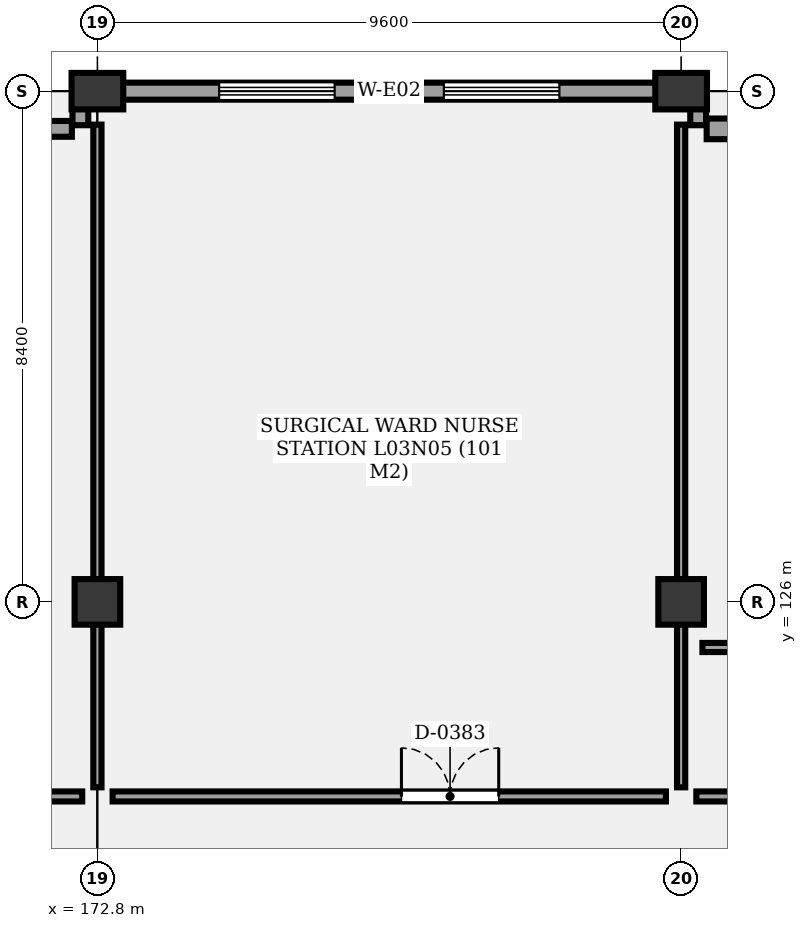
"""IFC4 building model, lengths in metres.
Left out: names, types, materials, properties, quantities, classifications, styles, units other than length and angle.
Written with IfcOpenShell. Run it as: python <this file> out.ifc"""

import sys

from ifc_helpers import new_model, si_unit, direction, frame, frame_2d, origin, origin_2d, place, context, subcontext, project, spatial, rectangle, extrude, element, fill, save


model = new_model("IFC4")
c1 = context("Model", 3, precision=1e-05, world=origin(), true_north=direction((0.0, 1.0)))
c2 = subcontext(c1, "Body", "Model", "MODEL_VIEW")
j1 = project(units=[si_unit("LENGTHUNIT", "METRE"), si_unit("PLANEANGLEUNIT", "RADIAN")], contexts=[c1])
p1 = place(None, origin())
s1 = spatial("IfcSite", under=j1, at=p1, CompositionType="ELEMENT")
p2 = place(p1, origin())
s2 = spatial("IfcBuilding", under=s1, at=p2, CompositionType="ELEMENT")
p3 = place(p2, frame((0.0, 0.0, 13.5)))
s3 = spatial("IfcBuildingStorey", under=s2, at=p3, CompositionType="ELEMENT", Elevation=13.5)
p4 = place(p3, frame((172.8, 126.0, 0.0), z_axis=(0.0, 0.0, 1.0), x_axis=(1.0, 0.0, 0.0)))
e1 = element("IfcColumn", 1, at=p4, inside=s3, PredefinedType="COLUMN", context=c2, shape_type="SweptSolid", body=[
    extrude(rectangle(XDim=0.75, YDim=0.75, at=origin_2d()), origin(), (0.0, 0.0, 1.0), 4.3),
])
p5 = place(p3, frame((172.8, 134.4, 0.0), z_axis=(0.0, 0.0, 1.0), x_axis=(1.0, 0.0, 0.0)))
e2 = element("IfcColumn", 2, at=p5, inside=s3, PredefinedType="COLUMN", context=c2, shape_type="SweptSolid", body=[
    extrude(rectangle(XDim=0.85, YDim=0.6, at=origin_2d()), origin(), (0.0, 0.0, 1.0), 4.3),
])
p6 = place(p3, frame((182.4, 126.0, 0.0), z_axis=(0.0, 0.0, 1.0), x_axis=(1.0, 0.0, 0.0)))
e3 = element("IfcColumn", 3, at=p6, inside=s3, PredefinedType="COLUMN", context=c2, shape_type="SweptSolid", body=[
    extrude(rectangle(XDim=0.75, YDim=0.75, at=origin_2d()), origin(), (0.0, 0.0, 1.0), 4.3),
])
p7 = place(p3, frame((182.4, 134.4, 0.0), z_axis=(0.0, 0.0, 1.0), x_axis=(1.0, 0.0, 0.0)))
e4 = element("IfcColumn", 4, at=p7, inside=s3, PredefinedType="COLUMN", context=c2, shape_type="SweptSolid", body=[
    extrude(rectangle(XDim=0.85, YDim=0.6, at=origin_2d()), origin(), (0.0, 0.0, 1.0), 4.3),
])
p8 = place(p3, frame((172.52, 134.2, 0.0), z_axis=(0.0, 0.0, 1.0), x_axis=(0.0, -1.0, 0.0)))
e5 = element("IfcWall", 5, at=p8, inside=s3, PredefinedType="SOLIDWALL", context=c2, shape_type="SweptSolid", body=[
    extrude(rectangle(XDim=0.36, YDim=0.26, at=frame_2d((0.18, 0.0))), origin(), (0.0, 0.0, 1.0), 3.49),
])
p9 = place(p3, frame((154.02, 133.78, 0.0), z_axis=(0.0, 0.0, 1.0), x_axis=(1.0, 0.0, 0.0)))
e6 = element("IfcWall", 6, at=p9, inside=s3, PredefinedType="SOLIDWALL", context=c2, shape_type="SweptSolid", body=[
    extrude(rectangle(XDim=18.36, YDim=0.26, at=frame_2d((9.18, 0.0))), origin(), (0.0, 0.0, 1.0), 3.49),
])
p10 = place(p3, frame((172.8, 134.4, 0.0), z_axis=(0.0, 0.0, 1.0), x_axis=(1.0, 0.0, 0.0)))
e7 = element("IfcWall", 7, at=p10, inside=s3, PredefinedType="SOLIDWALL", context=c2, shape_type="SweptSolid", body=[
    extrude(rectangle(XDim=9.6, YDim=0.28, at=frame_2d((4.8, 0.0))), origin(), (0.0, 0.0, 1.0), 3.49),
])
p11 = place(p10, frame((2.002, 0.0, 0.85)))
e8 = element("IfcOpeningElement", 8, at=p11, cuts=e7, PredefinedType="OPENING", context=c2, shape_type="SweptSolid", body=[
    extrude(rectangle(XDim=1.9, YDim=1.2, at=frame_2d((0.95, 0.6))), frame((0.0, 0.15, 0.0), z_axis=(0.0, -1.0, 0.0), x_axis=(1.0, 0.0, 0.0)), (0.0, 0.0, 1.0), 0.3),
])
p12 = place(p10, frame((5.698, 0.0, 0.85)))
e9 = element("IfcOpeningElement", 9, at=p12, cuts=e7, PredefinedType="OPENING", context=c2, shape_type="SweptSolid", body=[
    extrude(rectangle(XDim=1.9, YDim=1.2, at=frame_2d((0.95, 0.6))), frame((0.0, 0.15, 0.0), z_axis=(0.0, -1.0, 0.0), x_axis=(1.0, 0.0, 0.0)), (0.0, 0.0, 1.0), 0.3),
])
p13 = place(p3, frame((182.68, 134.2, 0.0), z_axis=(0.0, 0.0, 1.0), x_axis=(0.0, -1.0, 0.0)))
e10 = element("IfcWall", 10, at=p13, inside=s3, PredefinedType="SOLIDWALL", context=c2, shape_type="SweptSolid", body=[
    extrude(rectangle(XDim=0.36, YDim=0.26, at=frame_2d((0.18, 0.0))), origin(), (0.0, 0.0, 1.0), 3.49),
])
p14 = place(p3, frame((182.82, 133.78, 0.0), z_axis=(0.0, 0.0, 1.0), x_axis=(1.0, 0.0, 0.0)))
e11 = element("IfcWall", 11, at=p14, inside=s3, PredefinedType="SOLIDWALL", context=c2, shape_type="SweptSolid", body=[
    extrude(rectangle(XDim=8.76, YDim=0.34, at=frame_2d((4.38, 0.0))), origin(), (0.0, 0.0, 1.0), 3.49),
])
p15 = place(p3, frame((163.45, 122.8, 0.0), z_axis=(0.0, 0.0, 1.0), x_axis=(1.0, 0.0, 0.0)))
e12 = element("IfcWall", 12, at=p15, inside=s3, PredefinedType="PARTITIONING", context=c2, shape_type="SweptSolid", body=[
    extrude(rectangle(XDim=9.1, YDim=0.165, at=frame_2d((4.55, 0.0))), origin(), (0.0, 0.0, 1.0), 3.4),
])
p16 = place(p15, frame((4.75, 0.0, 0.0)))
e13 = element("IfcOpeningElement", 13, at=p16, cuts=e12, PredefinedType="OPENING", context=c2, shape_type="SweptSolid", body=[
    extrude(rectangle(XDim=1.35, YDim=2.4, at=frame_2d((0.675, 1.2))), frame((0.0, 0.093, 0.0), z_axis=(0.0, -1.0, 0.0), x_axis=(1.0, 0.0, 0.0)), (0.0, 0.0, 1.0), 0.185),
])
p17 = place(p3, frame((173.05, 122.8, 0.0), z_axis=(0.0, 0.0, 1.0), x_axis=(1.0, 0.0, 0.0)))
e14 = element("IfcWall", 14, at=p17, inside=s3, PredefinedType="PARTITIONING", context=c2, shape_type="SweptSolid", body=[
    extrude(rectangle(XDim=9.1, YDim=0.165, at=frame_2d((4.55, 0.0))), origin(), (0.0, 0.0, 1.0), 3.4),
])
p18 = place(p17, frame((4.75, 0.0, 0.0)))
e15 = element("IfcOpeningElement", 15, at=p18, cuts=e14, PredefinedType="OPENING", context=c2, shape_type="SweptSolid", body=[
    extrude(rectangle(XDim=1.6, YDim=2.2, at=frame_2d((0.8, 1.1))), frame((0.0, 0.093, 0.0), z_axis=(0.0, -1.0, 0.0), x_axis=(1.0, 0.0, 0.0)), (0.0, 0.0, 1.0), 0.185),
])
p19 = place(p3, frame((172.8, 122.95, 0.0), z_axis=(0.0, 0.0, 1.0), x_axis=(0.0, 1.0, 0.0)))
e16 = element("IfcWall", 16, at=p19, inside=s3, PredefinedType="PARTITIONING", context=c2, shape_type="SweptSolid", body=[
    extrude(rectangle(XDim=10.9, YDim=0.135, at=frame_2d((5.45, 0.0))), origin(), (0.0, 0.0, 1.0), 3.4),
])
p20 = place(p3, frame((182.65, 122.8, 0.0), z_axis=(0.0, 0.0, 1.0), x_axis=(1.0, 0.0, 0.0)))
e17 = element("IfcWall", 17, at=p20, inside=s3, PredefinedType="PARTITIONING", context=c2, shape_type="SweptSolid", body=[
    extrude(rectangle(XDim=9.1, YDim=0.165, at=frame_2d((4.55, 0.0))), origin(), (0.0, 0.0, 1.0), 3.4),
])
p21 = place(p20, frame((4.75, 0.0, 0.0)))
e18 = element("IfcOpeningElement", 18, at=p21, cuts=e17, PredefinedType="OPENING", context=c2, shape_type="SweptSolid", body=[
    extrude(rectangle(XDim=1.35, YDim=2.4, at=frame_2d((0.675, 1.2))), frame((0.0, 0.093, 0.0), z_axis=(0.0, -1.0, 0.0), x_axis=(1.0, 0.0, 0.0)), (0.0, 0.0, 1.0), 0.185),
])
p22 = place(p3, frame((182.75, 125.25, 0.0), z_axis=(0.0, 0.0, 1.0), x_axis=(1.0, 0.0, 0.0)))
e19 = element("IfcWall", 19, at=p22, inside=s3, PredefinedType="PARTITIONING", context=c2, shape_type="SweptSolid", body=[
    extrude(rectangle(XDim=2.2, YDim=0.15, at=frame_2d((1.1, 0.0))), origin(), (0.0, 0.0, 1.0), 3.4),
])
p23 = place(p3, frame((182.4, 122.95, 0.0), z_axis=(0.0, 0.0, 1.0), x_axis=(0.0, 1.0, 0.0)))
e20 = element("IfcWall", 20, at=p23, inside=s3, PredefinedType="PARTITIONING", context=c2, shape_type="SweptSolid", body=[
    extrude(rectangle(XDim=10.9, YDim=0.135, at=frame_2d((5.45, 0.0))), origin(), (0.0, 0.0, 1.0), 3.4),
])
p24 = place(p11, origin())
e21 = element("IfcWindow", 21, at=p24, inside=s3, PartitioningType="SINGLE_PANEL", PredefinedType="WINDOW", context=c2, shape_type="SweptSolid", body=[
    extrude(rectangle(XDim=1.9, YDim=1.2, at=frame_2d((0.95, 0.6))), frame((0.0, 0.03, 0.0), z_axis=(0.0, -1.0, 0.0), x_axis=(1.0, 0.0, 0.0)), (0.0, 0.0, 1.0), 0.06),
])
fill(e8, e21)
p25 = place(p12, origin())
e22 = element("IfcWindow", 22, at=p25, inside=s3, PartitioningType="SINGLE_PANEL", PredefinedType="WINDOW", context=c2, shape_type="SweptSolid", body=[
    extrude(rectangle(XDim=1.9, YDim=1.2, at=frame_2d((0.95, 0.6))), frame((0.0, 0.03, 0.0), z_axis=(0.0, -1.0, 0.0), x_axis=(1.0, 0.0, 0.0)), (0.0, 0.0, 1.0), 0.06),
])
fill(e9, e22)
p26 = place(p18, origin())
e23 = element("IfcDoor", 23, at=p26, inside=s3, OperationType="DOUBLE_DOOR_SINGLE_SWING", PredefinedType="DOOR", context=c2, shape_type="SweptSolid", body=[
    extrude(rectangle(XDim=1.6, YDim=2.2, at=frame_2d((0.8, 1.1))), frame((0.0, 0.025, 0.0), z_axis=(0.0, -1.0, 0.0), x_axis=(1.0, 0.0, 0.0)), (0.0, 0.0, 1.0), 0.05),
])
fill(e15, e23)
save(model, sys.argv[1])
